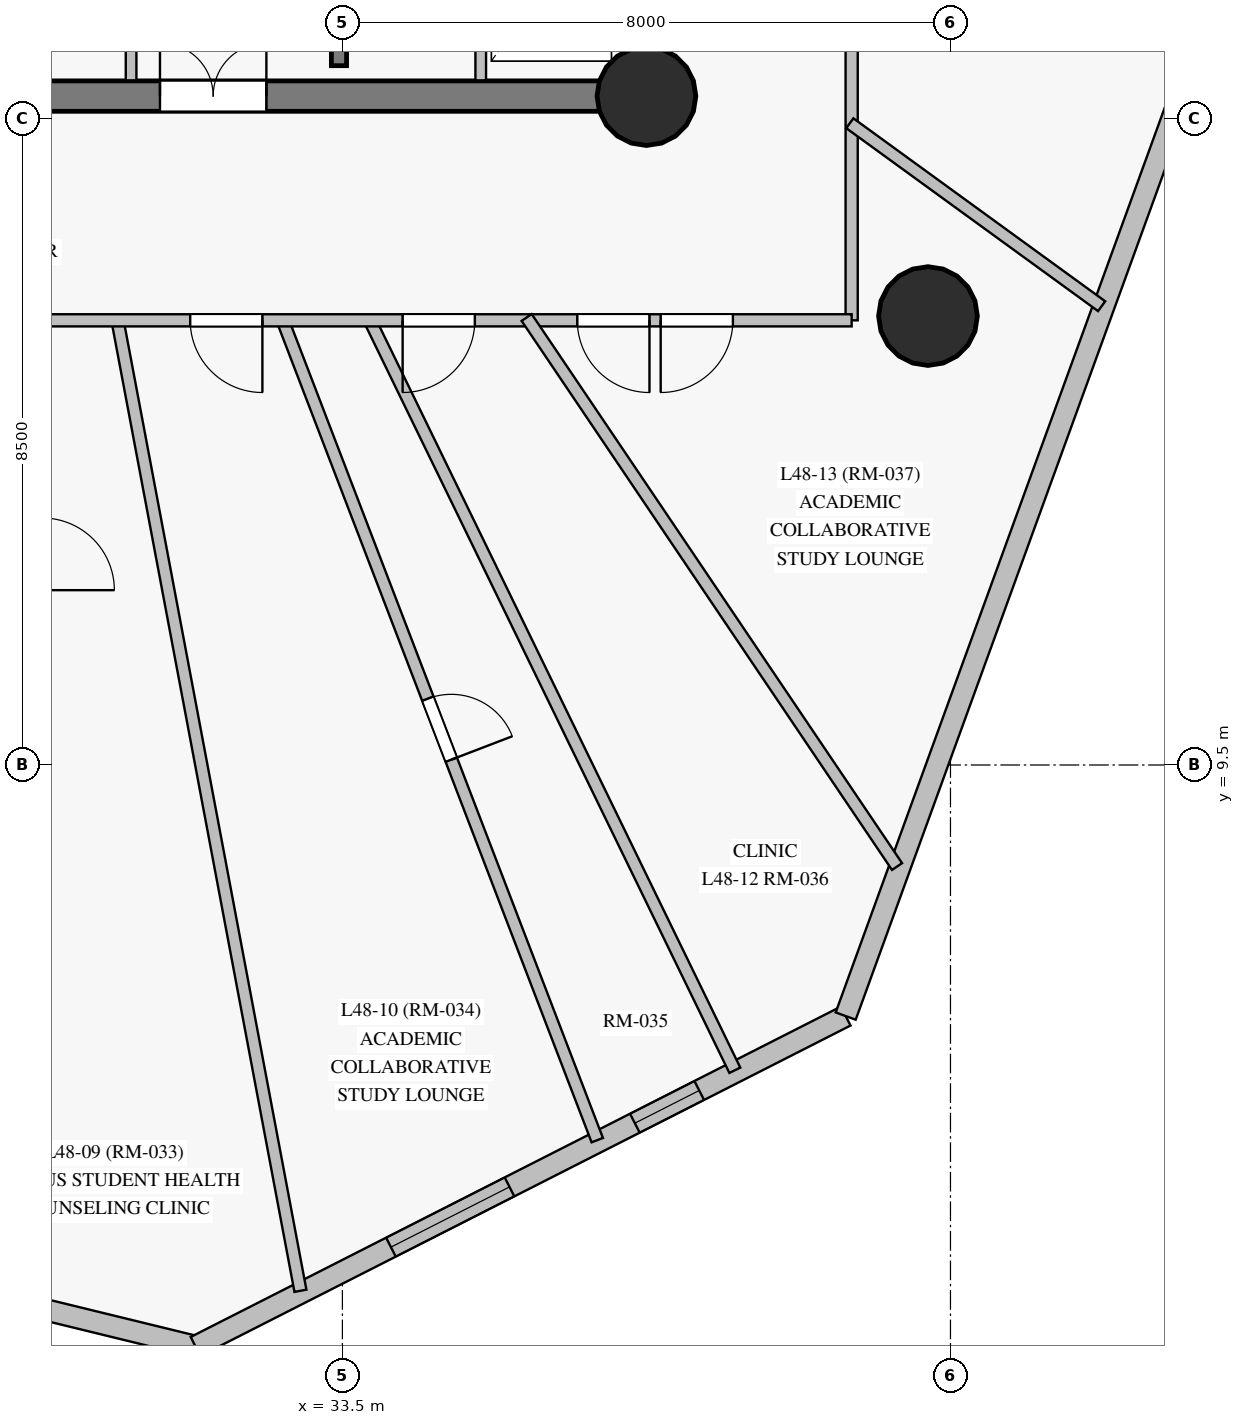
"""IFC4 building model, lengths in metres.
Left out: names, types, materials, properties, quantities, classifications, styles, units other than length and angle.
Written with IfcOpenShell. Run it as: python <this file> out.ifc"""

import sys

from ifc_helpers import new_model, si_unit, direction, frame, frame_2d, origin, origin_with_axes, origin_2d, place, context, subcontext, project, spatial, rectangle, circle, extrude, source, transform, mapped, element, fill, save


model = new_model("IFC4")
c1 = context("Model", 3, precision=1e-05, world=origin(), true_north=direction((0.0, 1.0)))
c2 = subcontext(c1, "Body", "Model", "MODEL_VIEW")
j1 = project(units=[si_unit("LENGTHUNIT", "METRE"), si_unit("PLANEANGLEUNIT", "RADIAN")], contexts=[c1])
p1 = place(None, origin())
s1 = spatial("IfcSite", under=j1, at=p1, CompositionType="ELEMENT")
p2 = place(p1, origin())
s2 = spatial("IfcBuilding", under=s1, at=p2, CompositionType="ELEMENT")
p3 = place(p2, frame((0.0, 0.0, 168.75)))
s3 = spatial("IfcBuildingStorey", under=s2, at=p3, CompositionType="ELEMENT", Elevation=168.75)
p4 = place(p3, frame((26.55, 18.3, 0.0), z_axis=(0.0, 0.0, 1.0), x_axis=(1.0, 0.0, 0.0)))
e1 = element("IfcWall", 1, at=p4, inside=s3, PredefinedType="SHEAR", context=c2, shape_type="SweptSolid", body=[
    extrude(rectangle(XDim=10.95, YDim=0.4, at=frame_2d((5.475, 0.0))), origin(), (0.0, 0.0, 1.0), 2.825),
])
p5 = place(p4, frame((4.55, 0.0, 0.0)))
e2 = element("IfcOpeningElement", 2, at=p5, cuts=e1, PredefinedType="OPENING", context=c2, shape_type="SweptSolid", body=[
    extrude(rectangle(XDim=1.4, YDim=2.2, at=frame_2d((0.7, 1.1))), frame((0.0, 0.21, 0.0), z_axis=(0.0, -1.0, 0.0), x_axis=(1.0, 0.0, 0.0)), (0.0, 0.0, 1.0), 0.42),
])
p6 = place(p3, frame((37.5, 18.3, 0.0), z_axis=(0.0, 0.0, 1.0), x_axis=(0.0, 1.0, 0.0)))
e3 = element("IfcWall", 3, at=p6, inside=s3, PredefinedType="SHEAR", context=c2, shape_type="SweptSolid", body=[
    extrude(rectangle(XDim=16.4, YDim=0.4, at=frame_2d((8.2, 0.0))), origin(), (0.0, 0.0, 1.0), 2.825),
])
p7 = place(p6, frame((14.15, 0.0, 0.0)))
e4 = element("IfcOpeningElement", 4, at=p7, cuts=e3, PredefinedType="OPENING", context=c2, shape_type="SweptSolid", body=[
    extrude(rectangle(XDim=1.2, YDim=2.15, at=frame_2d((0.6, 1.075))), frame((0.0, 0.21, 0.0), z_axis=(0.0, -1.0, 0.0), x_axis=(1.0, 0.0, 0.0)), (0.0, 0.0, 1.0), 0.42),
])
m1 = source(origin_with_axes(), c2, "Body", "SweptSolid", [
    extrude(circle(Radius=0.65, at=origin_2d()), origin(), (0.0, 0.0, 1.0), 3.05),
])
for number, where, z_axis, x_axis in (
    (5, (37.5, 18.3, 0.0), (0.0, 0.0, 1.0), (1.0, 0.0, 0.0)),
    (6, (41.204, 15.406, 0.0), (0.0, 0.0, 1.0), (1.0, 0.0, 0.0)),
):
    element("IfcColumn", number, at=place(p3, frame(where, z_axis=z_axis, x_axis=x_axis)), inside=s3, PredefinedType="COLUMN", context=c2, shape_type="MappedRepresentation", body=[
        mapped(m1, transform((0.0, 0.0, 0.0), scale=1.0)),
    ])
p8 = place(p3, frame((19.805, 4.723, 0.0), z_axis=(0.0, 0.0, 1.0), x_axis=(0.971447044885, -0.237256483544, 0.0)))
e7 = element("IfcWall", 7, at=p8, inside=s3, PredefinedType="SOLIDWALL", context=c2, shape_type="SweptSolid", body=[
    extrude(rectangle(XDim=12.108, YDim=0.28, at=frame_2d((6.054, 0.0))), origin(), (0.0, 0.0, 1.0), 2.495),
])
p9 = place(p3, frame((31.567, 1.85, 0.0), z_axis=(0.0, 0.0, 1.0), x_axis=(0.891507758559, 0.453005426491, 0.0)))
e8 = element("IfcWall", 8, at=p9, inside=s3, PredefinedType="SOLIDWALL", context=c2, shape_type="SweptSolid", body=[
    extrude(rectangle(XDim=9.595, YDim=0.28, at=frame_2d((4.798, 0.0))), origin(), (0.0, 0.0, 1.0), 2.825),
])
p10 = place(p9, frame((2.884, 0.0, 0.85)))
e9 = element("IfcOpeningElement", 9, at=p10, cuts=e8, PredefinedType="OPENING", context=c2, shape_type="SweptSolid", body=[
    extrude(rectangle(XDim=1.75, YDim=1.65, at=frame_2d((0.875, 0.825))), frame((0.0, 0.15, 0.0), z_axis=(0.0, -1.0, 0.0), x_axis=(1.0, 0.0, 0.0)), (0.0, 0.0, 1.0), 0.3),
])
p11 = place(p9, frame((6.484, 0.0, 0.85)))
e10 = element("IfcOpeningElement", 10, at=p11, cuts=e8, PredefinedType="OPENING", context=c2, shape_type="SweptSolid", body=[
    extrude(rectangle(XDim=0.95, YDim=1.5, at=frame_2d((0.475, 0.75))), frame((0.0, 0.15, 0.0), z_axis=(0.0, -1.0, 0.0), x_axis=(1.0, 0.0, 0.0)), (0.0, 0.0, 1.0), 0.3),
])
p12 = place(p3, frame((40.122, 6.197, 0.0), z_axis=(0.0, 0.0, 1.0), x_axis=(0.341766826374, 0.939784781953, 0.0)))
e11 = element("IfcWall", 11, at=p12, inside=s3, PredefinedType="SOLIDWALL", context=c2, shape_type="SweptSolid", body=[
    extrude(rectangle(XDim=14.023, YDim=0.28, at=frame_2d((7.012, 0.0))), origin(), (0.0, 0.0, 1.0), 2.495),
])
p13 = place(p3, frame((33.455, 18.7, 0.0), z_axis=(0.0, 0.0, 1.0), x_axis=(0.0, 1.0, 0.0)))
e12 = element("IfcWall", 12, at=p13, inside=s3, PredefinedType="SHEAR", context=c2, shape_type="SweptSolid", body=[
    extrude(rectangle(XDim=15.6, YDim=0.2, at=frame_2d((7.8, 0.0))), origin(), (0.0, 0.0, 1.0), 2.825),
])
p14 = place(p13, frame((2.75, 0.0, 0.0)))
e13 = element("IfcOpeningElement", 13, at=p14, cuts=e12, PredefinedType="OPENING", context=c2, shape_type="SweptSolid", body=[
    extrude(rectangle(XDim=1.15, YDim=2.15, at=frame_2d((0.575, 1.075))), frame((0.0, 0.11, 0.0), z_axis=(0.0, -1.0, 0.0), x_axis=(1.0, 0.0, 0.0)), (0.0, 0.0, 1.0), 0.22),
])
p15 = place(p13, frame((0.55, 0.0, 0.0)))
e14 = element("IfcOpeningElement", 14, at=p15, cuts=e12, PredefinedType="OPENING", context=c2, shape_type="SweptSolid", body=[
    extrude(rectangle(XDim=0.94, YDim=2.1, at=frame_2d((0.47, 1.05))), frame((0.0, 0.11, 0.0), z_axis=(0.0, -1.0, 0.0), x_axis=(1.0, 0.0, 0.0)), (0.0, 0.0, 1.0), 0.22),
])
p16 = place(p3, frame((40.2, 37.65, 0.0), z_axis=(0.0, 0.0, 1.0), x_axis=(0.0, -1.0, 0.0)))
e15 = element("IfcWall", 15, at=p16, inside=s3, PredefinedType="PARTITIONING", context=c2, shape_type="SweptSolid", body=[
    extrude(rectangle(XDim=22.3, YDim=0.16, at=frame_2d((11.15, 0.0))), origin(), (0.0, 0.0, 1.0), 2.375),
])
p17 = place(p16, frame((14.02, 0.0, 0.0)))
e16 = element("IfcOpeningElement", 16, at=p17, cuts=e15, PredefinedType="OPENING", context=c2, shape_type="SweptSolid", body=[
    extrude(rectangle(XDim=0.95, YDim=2.15, at=frame_2d((0.475, 1.075))), frame((0.0, 0.09, 0.0), z_axis=(0.0, -1.0, 0.0), x_axis=(1.0, 0.0, 0.0)), (0.0, 0.0, 1.0), 0.18),
])
p18 = place(p16, frame((10.675, 0.0, 0.0)))
e17 = element("IfcOpeningElement", 17, at=p18, cuts=e15, PredefinedType="OPENING", context=c2, shape_type="SweptSolid", body=[
    extrude(rectangle(XDim=0.95, YDim=2.15, at=frame_2d((0.475, 1.075))), frame((0.0, 0.09, 0.0), z_axis=(0.0, -1.0, 0.0), x_axis=(1.0, 0.0, 0.0)), (0.0, 0.0, 1.0), 0.18),
])
p19 = place(p16, frame((7.33, 0.0, 0.0)))
e18 = element("IfcOpeningElement", 18, at=p19, cuts=e15, PredefinedType="OPENING", context=c2, shape_type="SweptSolid", body=[
    extrude(rectangle(XDim=0.95, YDim=2.15, at=frame_2d((0.475, 1.075))), frame((0.0, 0.09, 0.0), z_axis=(0.0, -1.0, 0.0), x_axis=(1.0, 0.0, 0.0)), (0.0, 0.0, 1.0), 0.18),
])
p20 = place(p16, frame((2.181, 0.0, 0.0)))
e19 = element("IfcOpeningElement", 19, at=p20, cuts=e15, PredefinedType="OPENING", context=c2, shape_type="SweptSolid", body=[
    extrude(rectangle(XDim=0.95, YDim=2.15, at=frame_2d((0.475, 1.075))), frame((0.0, 0.09, 0.0), z_axis=(0.0, -1.0, 0.0), x_axis=(1.0, 0.0, 0.0)), (0.0, 0.0, 1.0), 0.18),
])
p21 = place(p3, frame((30.535, 15.379, 0.0), z_axis=(0.0, 0.0, 1.0), x_axis=(0.185266445882, -0.982688324969, 0.0)))
e20 = element("IfcWall", 20, at=p21, inside=s3, PredefinedType="PARTITIONING", context=c2, shape_type="SweptSolid", body=[
    extrude(rectangle(XDim=13.022, YDim=0.16, at=frame_2d((6.511, 0.0))), origin(), (0.0, 0.0, 1.0), 2.825),
])
p22 = place(p3, frame((32.704, 15.378, 0.0), z_axis=(0.0, 0.0, 1.0), x_axis=(0.358255772145, -0.933623479634, 0.0)))
e21 = element("IfcWall", 21, at=p22, inside=s3, PredefinedType="PARTITIONING", context=c2, shape_type="SweptSolid", body=[
    extrude(rectangle(XDim=11.582, YDim=0.16, at=frame_2d((5.791, 0.0))), origin(), (0.0, 0.0, 1.0), 2.825),
])
p23 = place(p22, frame((5.361, 0.0, 0.0)))
e22 = element("IfcOpeningElement", 22, at=p23, cuts=e21, PredefinedType="OPENING", context=c2, shape_type="SweptSolid", body=[
    extrude(rectangle(XDim=0.86, YDim=2.04, at=frame_2d((0.43, 1.02))), frame((0.0, 0.09, 0.0), z_axis=(0.0, -1.0, 0.0), x_axis=(1.0, 0.0, 0.0)), (0.0, 0.0, 1.0), 0.18),
])
p24 = place(p3, frame((33.847, 15.377, 0.0), z_axis=(0.0, 0.0, 1.0), x_axis=(0.437647071578, -0.899146840477, 0.0)))
e23 = element("IfcWall", 23, at=p24, inside=s3, PredefinedType="PARTITIONING", context=c2, shape_type="SweptSolid", body=[
    extrude(rectangle(XDim=11.003, YDim=0.16, at=frame_2d((5.501, 0.0))), origin(), (0.0, 0.0, 1.0), 2.825),
])
p25 = place(p3, frame((40.2, 15.35, 0.0), z_axis=(0.0, 0.0, 1.0), x_axis=(-1.0, 0.0, 0.0)))
e24 = element("IfcWall", 24, at=p25, inside=s3, PredefinedType="PARTITIONING", context=c2, shape_type="SweptSolid", body=[
    extrude(rectangle(XDim=10.65, YDim=0.16, at=frame_2d((5.325, 0.0))), origin(), (0.0, 0.0, 1.0), 2.275),
])
p26 = place(p25, frame((7.752, 0.0, 0.0)))
e25 = element("IfcOpeningElement", 25, at=p26, cuts=e24, PredefinedType="OPENING", context=c2, shape_type="SweptSolid", body=[
    extrude(rectangle(XDim=0.95, YDim=2.15, at=frame_2d((0.475, 1.075))), frame((0.0, 0.09, 0.0), z_axis=(0.0, -1.0, 0.0), x_axis=(1.0, 0.0, 0.0)), (0.0, 0.0, 1.0), 0.18),
])
p27 = place(p25, frame((4.958, 0.0, 0.0)))
e26 = element("IfcOpeningElement", 26, at=p27, cuts=e24, PredefinedType="OPENING", context=c2, shape_type="SweptSolid", body=[
    extrude(rectangle(XDim=0.95, YDim=2.15, at=frame_2d((0.475, 1.075))), frame((0.0, 0.09, 0.0), z_axis=(0.0, -1.0, 0.0), x_axis=(1.0, 0.0, 0.0)), (0.0, 0.0, 1.0), 0.18),
])
p28 = place(p25, frame((2.66, 0.0, 0.0)))
e27 = element("IfcOpeningElement", 27, at=p28, cuts=e24, PredefinedType="OPENING", context=c2, shape_type="SweptSolid", body=[
    extrude(rectangle(XDim=0.95, YDim=2.15, at=frame_2d((0.475, 1.075))), frame((0.0, 0.09, 0.0), z_axis=(0.0, -1.0, 0.0), x_axis=(1.0, 0.0, 0.0)), (0.0, 0.0, 1.0), 0.18),
])
p29 = place(p25, frame((1.562, 0.0, 0.0)))
e28 = element("IfcOpeningElement", 28, at=p29, cuts=e24, PredefinedType="OPENING", context=c2, shape_type="SweptSolid", body=[
    extrude(rectangle(XDim=0.95, YDim=2.15, at=frame_2d((0.475, 1.075))), frame((0.0, 0.09, 0.0), z_axis=(0.0, -1.0, 0.0), x_axis=(1.0, 0.0, 0.0)), (0.0, 0.0, 1.0), 0.18),
])
p30 = place(p3, frame((35.924, 15.387, 0.0), z_axis=(0.0, 0.0, 1.0), x_axis=(0.559237513515, -0.829007480954, 0.0)))
e29 = element("IfcWall", 29, at=p30, inside=s3, PredefinedType="PARTITIONING", context=c2, shape_type="SweptSolid", body=[
    extrude(rectangle(XDim=8.713, YDim=0.16, at=frame_2d((4.357, 0.0))), origin(), (0.0, 0.0, 1.0), 2.825),
])
p31 = place(p3, frame((40.176, 17.943, 0.0), z_axis=(0.0, 0.0, 1.0), x_axis=(0.809001558412, -0.587806497486, 0.0)))
e30 = element("IfcWall", 30, at=p31, inside=s3, PredefinedType="PARTITIONING", context=c2, shape_type="SweptSolid", body=[
    extrude(rectangle(XDim=4.095, YDim=0.16, at=frame_2d((2.047, 0.0))), origin(), (0.0, 0.0, 1.0), 2.825),
])
p32 = place(p3, frame((30.72, 18.507, 0.0), z_axis=(0.0, 0.0, 1.0), x_axis=(0.0, 1.0, 0.0)))
e31 = element("IfcWall", 31, at=p32, inside=s3, PredefinedType="PARTITIONING", context=c2, shape_type="SweptSolid", body=[
    extrude(rectangle(XDim=2.733, YDim=0.14, at=frame_2d((1.366, 0.0))), origin(), (0.0, 0.0, 1.0), 2.825),
])
p33 = place(p3, frame((35.32, 18.507, 0.0), z_axis=(0.0, 0.0, 1.0), x_axis=(0.0, 1.0, 0.0)))
e32 = element("IfcWall", 32, at=p33, inside=s3, PredefinedType="PARTITIONING", context=c2, shape_type="SweptSolid", body=[
    extrude(rectangle(XDim=2.604, YDim=0.14, at=frame_2d((1.302, 0.0))), origin(), (0.0, 0.0, 1.0), 2.825),
])
m2 = source(origin_with_axes(), c2, "Body", "SweptSolid", [
    extrude(rectangle(XDim=1.75, YDim=1.65, at=frame_2d((0.875, 0.825))), frame((0.0, 0.03, 0.0), z_axis=(0.0, -1.0, 0.0), x_axis=(1.0, 0.0, 0.0)), (0.0, 0.0, 1.0), 0.06),
])
p34 = place(p10, origin())
e33 = element("IfcWindow", 33, at=p34, inside=s3, PartitioningType="SINGLE_PANEL", PredefinedType="WINDOW", context=c2, shape_type="MappedRepresentation", body=[
    mapped(m2, transform((0.0, 0.0, 0.0), scale=1.0)),
])
fill(e9, e33)
m3 = source(origin_with_axes(), c2, "Body", "SweptSolid", [
    extrude(rectangle(XDim=0.95, YDim=1.5, at=frame_2d((0.475, 0.75))), frame((0.0, 0.03, 0.0), z_axis=(0.0, -1.0, 0.0), x_axis=(1.0, 0.0, 0.0)), (0.0, 0.0, 1.0), 0.06),
])
p35 = place(p11, origin())
e34 = element("IfcWindow", 34, at=p35, inside=s3, PartitioningType="SINGLE_PANEL", PredefinedType="WINDOW", context=c2, shape_type="MappedRepresentation", body=[
    mapped(m3, transform((0.0, 0.0, 0.0), scale=1.0)),
])
fill(e10, e34)
m4 = source(origin_with_axes(), c2, "Body", "SweptSolid", [
    extrude(rectangle(XDim=1.4, YDim=2.2, at=frame_2d((0.7, 1.1))), frame((0.0, 0.025, 0.0), z_axis=(0.0, -1.0, 0.0), x_axis=(1.0, 0.0, 0.0)), (0.0, 0.0, 1.0), 0.05),
])
p36 = place(p5, origin())
e35 = element("IfcDoor", 35, at=p36, inside=s3, OperationType="DOUBLE_DOOR_SINGLE_SWING", PredefinedType="DOOR", context=c2, shape_type="MappedRepresentation", body=[
    mapped(m4, transform((0.0, 0.0, 0.0), scale=1.0)),
])
fill(e2, e35)
m5 = source(origin_with_axes(), c2, "Body", "SweptSolid", [
    extrude(rectangle(XDim=0.95, YDim=2.15, at=frame_2d((0.475, 1.075))), frame((0.0, 0.025, 0.0), z_axis=(0.0, -1.0, 0.0), x_axis=(1.0, 0.0, 0.0)), (0.0, 0.0, 1.0), 0.05),
])
p37 = place(p26, origin())
e36 = element("IfcDoor", 36, at=p37, inside=s3, OperationType="SINGLE_SWING_LEFT", PredefinedType="DOOR", context=c2, shape_type="MappedRepresentation", body=[
    mapped(m5, transform((0.0, 0.0, 0.0), scale=1.0)),
])
fill(e25, e36)
p38 = place(p27, origin())
e37 = element("IfcDoor", 37, at=p38, inside=s3, OperationType="SINGLE_SWING_RIGHT", PredefinedType="DOOR", context=c2, shape_type="MappedRepresentation", body=[
    mapped(m5, transform((0.0, 0.0, 0.0), scale=1.0)),
])
fill(e26, e37)
p39 = place(p28, origin())
e38 = element("IfcDoor", 38, at=p39, inside=s3, OperationType="SINGLE_SWING_LEFT", PredefinedType="DOOR", context=c2, shape_type="MappedRepresentation", body=[
    mapped(m5, transform((0.0, 0.0, 0.0), scale=1.0)),
])
fill(e27, e38)
p40 = place(p29, origin())
e39 = element("IfcDoor", 39, at=p40, inside=s3, OperationType="SINGLE_SWING_RIGHT", PredefinedType="DOOR", context=c2, shape_type="MappedRepresentation", body=[
    mapped(m5, transform((0.0, 0.0, 0.0), scale=1.0)),
])
fill(e28, e39)
m6 = source(origin_with_axes(), c2, "Body", "SweptSolid", [
    extrude(rectangle(XDim=0.86, YDim=2.04, at=frame_2d((0.43, 1.02))), frame((0.0, 0.025, 0.0), z_axis=(0.0, -1.0, 0.0), x_axis=(1.0, 0.0, 0.0)), (0.0, 0.0, 1.0), 0.05),
])
p41 = place(p23, origin())
e40 = element("IfcDoor", 40, at=p41, inside=s3, OperationType="SINGLE_SWING_RIGHT", PredefinedType="DOOR", context=c2, shape_type="MappedRepresentation", body=[
    mapped(m6, transform((0.0, 0.0, 0.0), scale=1.0)),
])
fill(e22, e40)
save(model, sys.argv[1])
